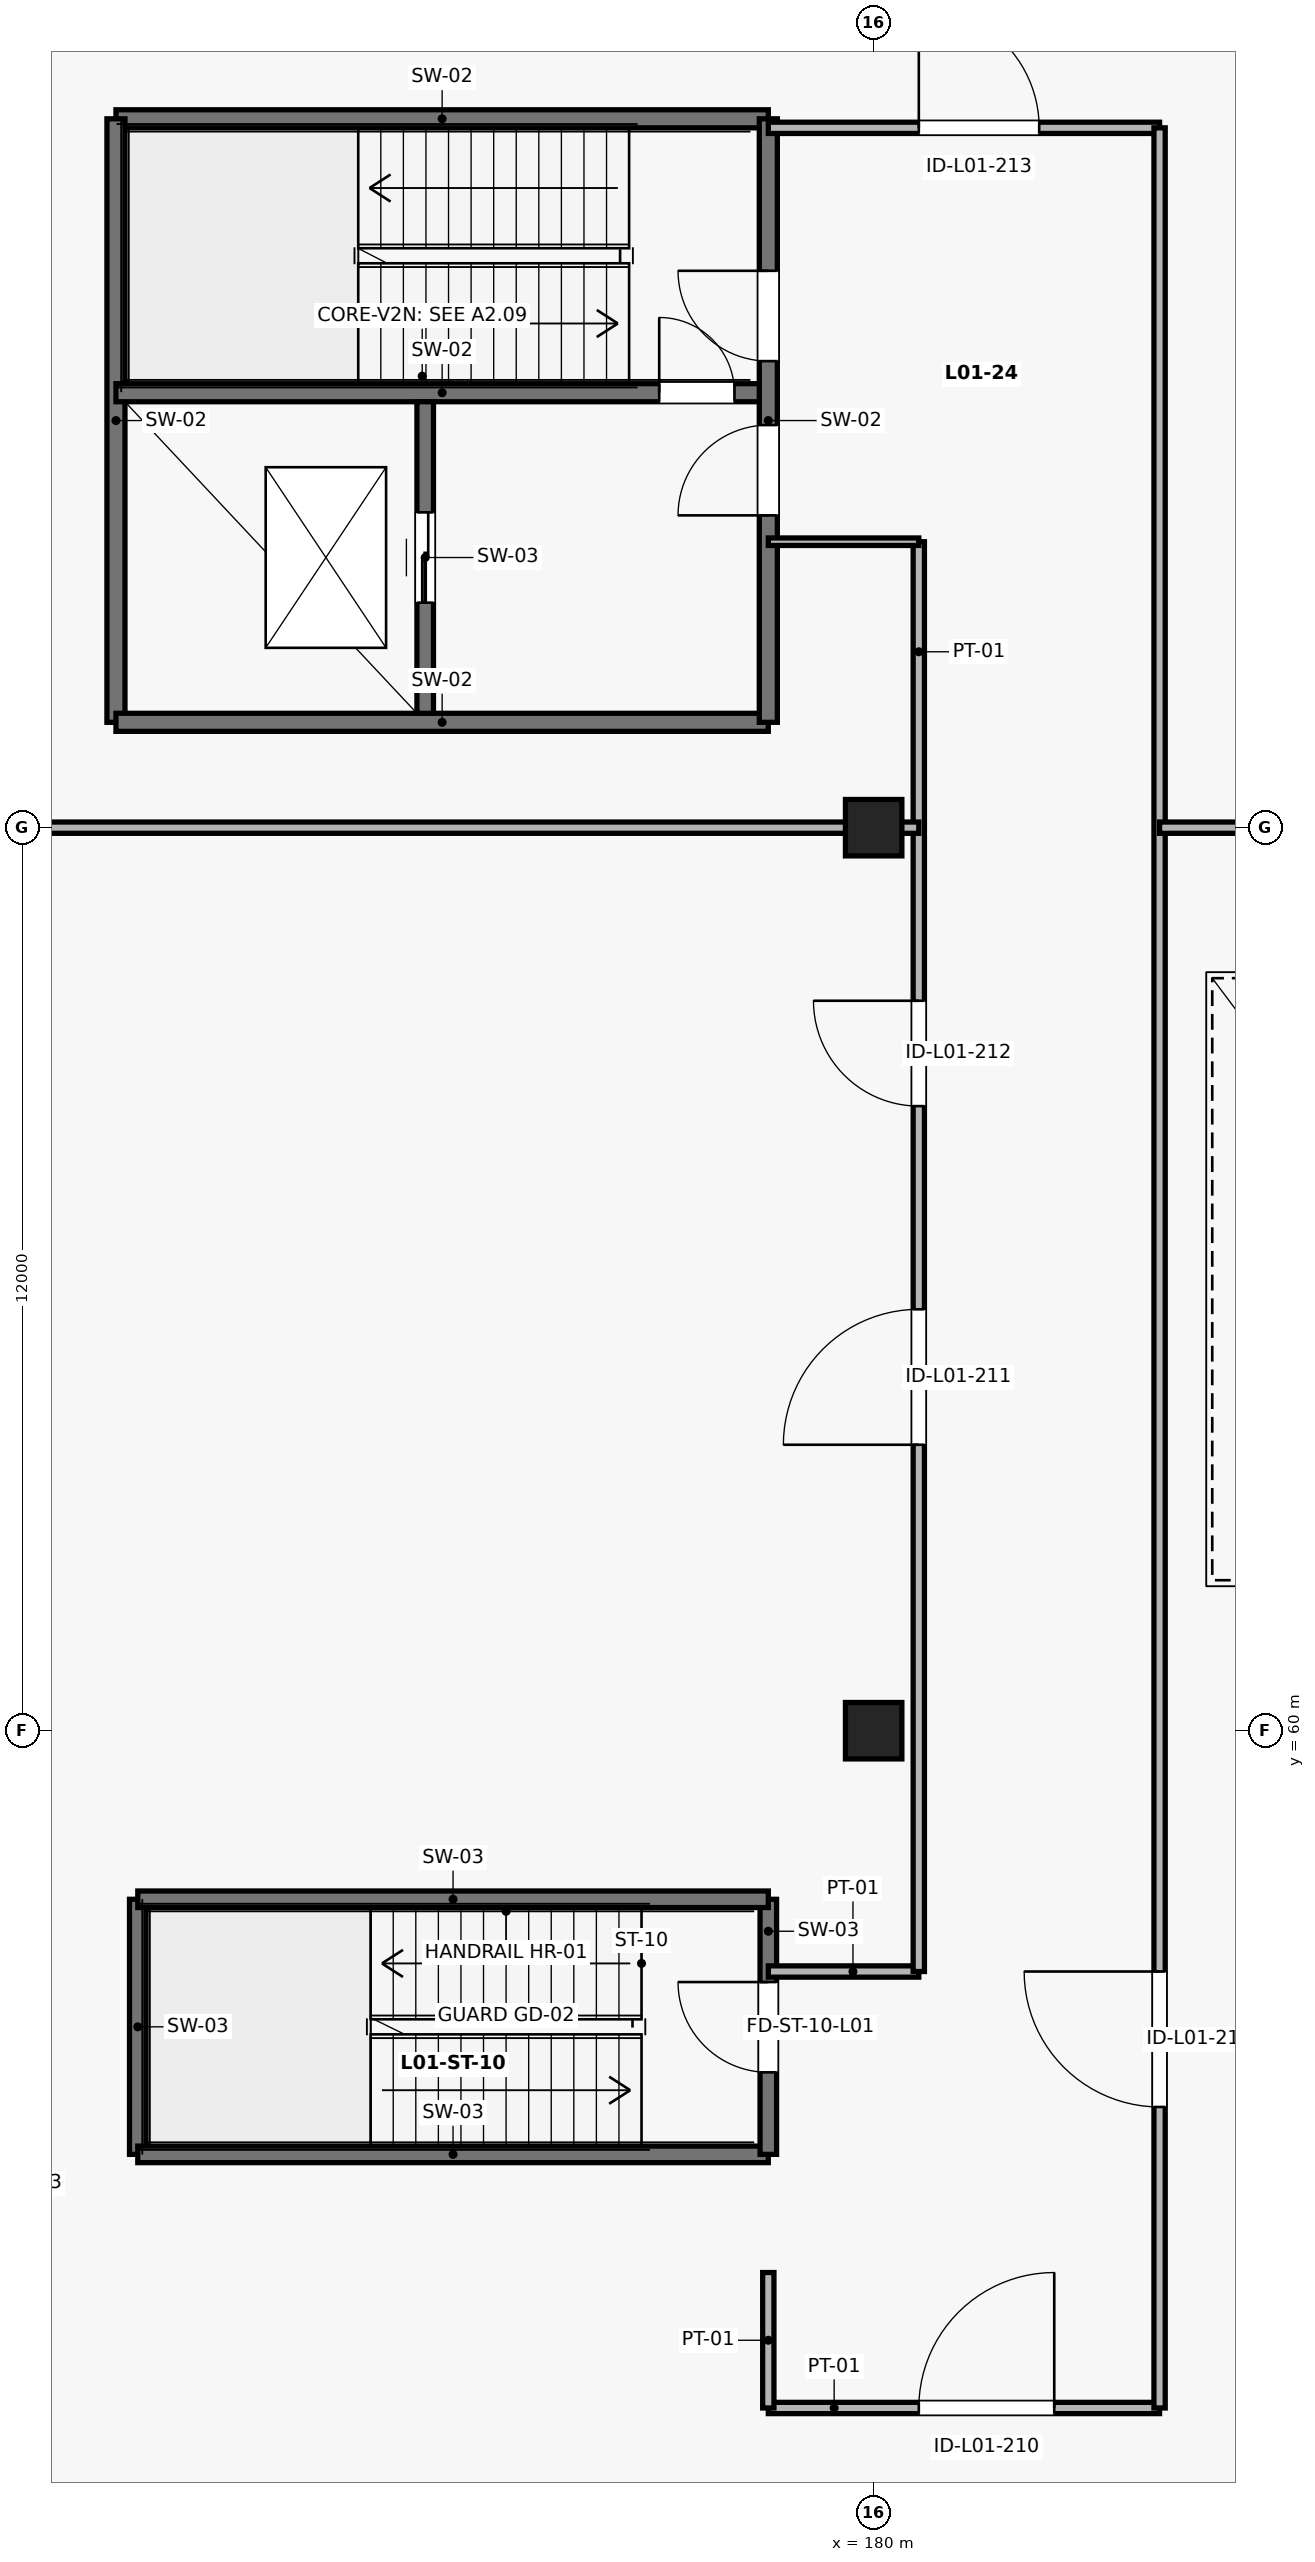
"""IFC4 building model, lengths in metres.
Left out: names, types, materials, properties, quantities, classifications, styles, units other than length and angle.
Written with IfcOpenShell. Run it as: python <this file> out.ifc"""

import sys

from ifc_helpers import new_model, si_unit, direction, frame, frame_2d, origin, origin_2d, place, context, subcontext, project, spatial, rectangle, extrude, element, fill, save


model = new_model("IFC4")
c1 = context("Model", 3, precision=1e-05, world=origin(), true_north=direction((0.0, 1.0)))
c2 = subcontext(c1, "Body", "Model", "MODEL_VIEW")
j1 = project(units=[si_unit("LENGTHUNIT", "METRE"), si_unit("PLANEANGLEUNIT", "RADIAN")], contexts=[c1])
p1 = place(None, origin())
s1 = spatial("IfcSite", under=j1, at=p1, CompositionType="ELEMENT")
p2 = place(p1, origin())
s2 = spatial("IfcBuilding", under=s1, at=p2, CompositionType="ELEMENT")
p3 = place(p2, frame((0.0, 0.0, 6.6)))
s3 = spatial("IfcBuildingStorey", under=s2, at=p3, CompositionType="ELEMENT", Elevation=6.6)
for number, where, z_axis, x_axis in (
    (1, (180.0, 60.0, 0.0), (0.0, 0.0, 1.0), (1.0, 0.0, 0.0)),
    (2, (180.0, 72.0, 0.0), (0.0, 0.0, 1.0), (1.0, 0.0, 0.0)),
):
    element("IfcColumn", number, at=place(p3, frame(where, z_axis=z_axis, x_axis=x_axis)), inside=s3, PredefinedType="COLUMN", context=c2, shape_type="SweptSolid", body=[
        extrude(rectangle(XDim=0.75, YDim=0.75, at=origin_2d()), origin(), (0.0, 0.0, 1.0), 4.8),
    ])
p4 = place(p3, frame((178.6, 81.42, 0.0), z_axis=(0.0, 0.0, 1.0), x_axis=(-1.0, 0.0, 0.0)))
e3 = element("IfcWall", 3, at=p4, inside=s3, PredefinedType="SHEAR", context=c2, shape_type="SweptSolid", body=[
    extrude(rectangle(XDim=8.67, YDim=0.24, at=frame_2d((4.335, 0.0))), origin(), (0.0, 0.0, 1.0), 4.45),
])
p5 = place(p3, frame((169.93, 81.42, 0.0), z_axis=(0.0, 0.0, 1.0), x_axis=(0.0, -1.0, 0.0)))
e4 = element("IfcWall", 4, at=p5, inside=s3, PredefinedType="SHEAR", context=c2, shape_type="SweptSolid", body=[
    extrude(rectangle(XDim=8.02, YDim=0.24, at=frame_2d((4.01, 0.0))), origin(), (0.0, 0.0, 1.0), 4.45),
])
p6 = place(p3, frame((169.93, 73.4, 0.0), z_axis=(0.0, 0.0, 1.0), x_axis=(1.0, 0.0, 0.0)))
e5 = element("IfcWall", 5, at=p6, inside=s3, PredefinedType="SHEAR", context=c2, shape_type="SweptSolid", body=[
    extrude(rectangle(XDim=8.67, YDim=0.24, at=frame_2d((4.335, 0.0))), origin(), (0.0, 0.0, 1.0), 4.45),
])
p7 = place(p3, frame((169.93, 77.78, 0.0), z_axis=(0.0, 0.0, 1.0), x_axis=(1.0, 0.0, 0.0)))
e6 = element("IfcWall", 6, at=p7, inside=s3, PredefinedType="SHEAR", context=c2, shape_type="SweptSolid", body=[
    extrude(rectangle(XDim=8.67, YDim=0.24, at=frame_2d((4.335, 0.0))), origin(), (0.0, 0.0, 1.0), 4.45),
])
p8 = place(p7, frame((7.22, 0.0, 0.0)))
e7 = element("IfcOpeningElement", 7, at=p8, cuts=e6, PredefinedType="OPENING", context=c2, shape_type="SweptSolid", body=[
    extrude(rectangle(XDim=1.0, YDim=2.2, at=frame_2d((0.5, 1.1))), frame((0.0, 0.135, 0.0), z_axis=(0.0, -1.0, 0.0), x_axis=(1.0, 0.0, 0.0)), (0.0, 0.0, 1.0), 0.27),
])
p9 = place(p3, frame((178.6, 73.4, 0.0), z_axis=(0.0, 0.0, 1.0), x_axis=(0.0, 1.0, 0.0)))
e8 = element("IfcWall", 8, at=p9, inside=s3, PredefinedType="SHEAR", context=c2, shape_type="SweptSolid", body=[
    extrude(rectangle(XDim=8.02, YDim=0.24, at=frame_2d((4.01, 0.0))), origin(), (0.0, 0.0, 1.0), 4.45),
])
p10 = place(p9, frame((2.75, 0.0, 0.0)))
e9 = element("IfcOpeningElement", 9, at=p10, cuts=e8, PredefinedType="OPENING", context=c2, shape_type="SweptSolid", body=[
    extrude(rectangle(XDim=1.2, YDim=2.2, at=frame_2d((0.6, 1.1))), frame((0.0, 0.135, 0.0), z_axis=(0.0, -1.0, 0.0), x_axis=(1.0, 0.0, 0.0)), (0.0, 0.0, 1.0), 0.27),
])
p11 = place(p9, frame((4.8, 0.0, 0.0)))
e10 = element("IfcOpeningElement", 10, at=p11, cuts=e8, PredefinedType="OPENING", context=c2, shape_type="SweptSolid", body=[
    extrude(rectangle(XDim=1.2, YDim=2.2, at=frame_2d((0.6, 1.1))), frame((0.0, 0.135, 0.0), z_axis=(0.0, -1.0, 0.0), x_axis=(1.0, 0.0, 0.0)), (0.0, 0.0, 1.0), 0.27),
])
p12 = place(p3, frame((174.04, 73.52, 0.0), z_axis=(0.0, 0.0, 1.0), x_axis=(0.0, 1.0, 0.0)))
e11 = element("IfcWall", 11, at=p12, inside=s3, PredefinedType="SHEAR", context=c2, shape_type="SweptSolid", body=[
    extrude(rectangle(XDim=4.14, YDim=0.22, at=frame_2d((2.07, 0.0))), origin(), (0.0, 0.0, 1.0), 4.45),
])
p13 = place(p12, frame((1.47, 0.0, 0.0)))
e12 = element("IfcOpeningElement", 12, at=p13, cuts=e11, PredefinedType="OPENING", context=c2, shape_type="SweptSolid", body=[
    extrude(rectangle(XDim=1.2, YDim=2.2, at=frame_2d((0.6, 1.1))), frame((0.0, 0.125, 0.0), z_axis=(0.0, -1.0, 0.0), x_axis=(1.0, 0.0, 0.0)), (0.0, 0.0, 1.0), 0.25),
])
p14 = place(p3, frame((170.22, 57.76, 0.0), z_axis=(0.0, 0.0, 1.0), x_axis=(0.0, -1.0, 0.0)))
e13 = element("IfcWall", 13, at=p14, inside=s3, PredefinedType="SHEAR", context=c2, shape_type="SweptSolid", body=[
    extrude(rectangle(XDim=3.39, YDim=0.22, at=frame_2d((1.695, 0.0))), origin(), (0.0, 0.0, 1.0), 4.47),
])
p15 = place(p3, frame((170.22, 54.37, 0.0), z_axis=(0.0, 0.0, 1.0), x_axis=(1.0, 0.0, 0.0)))
e14 = element("IfcWall", 14, at=p15, inside=s3, PredefinedType="SHEAR", context=c2, shape_type="SweptSolid", body=[
    extrude(rectangle(XDim=8.38, YDim=0.22, at=frame_2d((4.19, 0.0))), origin(), (0.0, 0.0, 1.0), 4.47),
])
p16 = place(p3, frame((178.6, 54.37, 0.0), z_axis=(0.0, 0.0, 1.0), x_axis=(0.0, 1.0, 0.0)))
e15 = element("IfcWall", 15, at=p16, inside=s3, PredefinedType="SHEAR", context=c2, shape_type="SweptSolid", body=[
    extrude(rectangle(XDim=3.39, YDim=0.22, at=frame_2d((1.695, 0.0))), origin(), (0.0, 0.0, 1.0), 4.47),
])
p17 = place(p16, frame((1.09, 0.0, 0.0)))
e16 = element("IfcOpeningElement", 16, at=p17, cuts=e15, PredefinedType="OPENING", context=c2, shape_type="SweptSolid", body=[
    extrude(rectangle(XDim=1.2, YDim=2.2, at=frame_2d((0.6, 1.1))), frame((0.0, 0.125, 0.0), z_axis=(0.0, -1.0, 0.0), x_axis=(1.0, 0.0, 0.0)), (0.0, 0.0, 1.0), 0.25),
])
p18 = place(p3, frame((178.6, 57.76, 0.0), z_axis=(0.0, 0.0, 1.0), x_axis=(-1.0, 0.0, 0.0)))
e17 = element("IfcWall", 17, at=p18, inside=s3, PredefinedType="SHEAR", context=c2, shape_type="SweptSolid", body=[
    extrude(rectangle(XDim=8.38, YDim=0.22, at=frame_2d((4.19, 0.0))), origin(), (0.0, 0.0, 1.0), 4.47),
])
p19 = place(p3, frame((178.6, 51.0, 0.0), z_axis=(0.0, 0.0, 1.0), x_axis=(1.0, 0.0, 0.0)))
e18 = element("IfcWall", 18, at=p19, inside=s3, PredefinedType="PARTITIONING", context=c2, shape_type="SweptSolid", body=[
    extrude(rectangle(XDim=5.2, YDim=0.15, at=frame_2d((2.6, 0.0))), origin(), (0.0, 0.0, 1.0), 3.253),
])
p20 = place(p19, frame((2.0, 0.0, 0.0)))
e19 = element("IfcOpeningElement", 19, at=p20, cuts=e18, PredefinedType="OPENING", context=c2, shape_type="SweptSolid", body=[
    extrude(rectangle(XDim=1.8, YDim=2.2, at=frame_2d((0.9, 1.1))), frame((0.0, 0.09, 0.0), z_axis=(0.0, -1.0, 0.0), x_axis=(1.0, 0.0, 0.0)), (0.0, 0.0, 1.0), 0.18),
])
p21 = place(p3, frame((178.6, 51.0, 0.0), z_axis=(0.0, 0.0, 1.0), x_axis=(0.0, 1.0, 0.0)))
e20 = element("IfcWall", 20, at=p21, inside=s3, PredefinedType="PARTITIONING", context=c2, shape_type="SweptSolid", body=[
    extrude(rectangle(XDim=1.8, YDim=0.15, at=frame_2d((0.9, 0.0))), origin(), (0.0, 0.0, 1.0), 4.46),
])
p22 = place(p3, frame((178.6, 56.8, 0.0), z_axis=(0.0, 0.0, 1.0), x_axis=(1.0, 0.0, 0.0)))
e21 = element("IfcWall", 21, at=p22, inside=s3, PredefinedType="PARTITIONING", context=c2, shape_type="SweptSolid", body=[
    extrude(rectangle(XDim=2.0, YDim=0.15, at=frame_2d((1.0, 0.0))), origin(), (0.0, 0.0, 1.0), 3.253),
])
p23 = place(p3, frame((180.6, 56.8, 0.0), z_axis=(0.0, 0.0, 1.0), x_axis=(0.0, 1.0, 0.0)))
e22 = element("IfcWall", 22, at=p23, inside=s3, PredefinedType="PARTITIONING", context=c2, shape_type="SweptSolid", body=[
    extrude(rectangle(XDim=19.0, YDim=0.15, at=frame_2d((9.5, 0.0))), origin(), (0.0, 0.0, 1.0), 3.153),
])
p24 = place(p23, frame((7.0, 0.0, 0.0)))
e23 = element("IfcOpeningElement", 23, at=p24, cuts=e22, PredefinedType="OPENING", context=c2, shape_type="SweptSolid", body=[
    extrude(rectangle(XDim=1.8, YDim=2.2, at=frame_2d((0.9, 1.1))), frame((0.0, 0.09, 0.0), z_axis=(0.0, -1.0, 0.0), x_axis=(1.0, 0.0, 0.0)), (0.0, 0.0, 1.0), 0.18),
])
p25 = place(p23, frame((11.5, 0.0, 0.0)))
e24 = element("IfcOpeningElement", 24, at=p25, cuts=e22, PredefinedType="OPENING", context=c2, shape_type="SweptSolid", body=[
    extrude(rectangle(XDim=1.4, YDim=2.2, at=frame_2d((0.7, 1.1))), frame((0.0, 0.09, 0.0), z_axis=(0.0, -1.0, 0.0), x_axis=(1.0, 0.0, 0.0)), (0.0, 0.0, 1.0), 0.18),
])
p26 = place(p3, frame((178.6, 75.8, 0.0), z_axis=(0.0, 0.0, 1.0), x_axis=(1.0, 0.0, 0.0)))
e25 = element("IfcWall", 25, at=p26, inside=s3, PredefinedType="PARTITIONING", context=c2, shape_type="SweptSolid", body=[
    extrude(rectangle(XDim=2.0, YDim=0.1, at=frame_2d((1.0, 0.0))), origin(), (0.0, 0.0, 1.0), 3.633),
])
p27 = place(p3, frame((178.6, 81.3, 0.0), z_axis=(0.0, 0.0, 1.0), x_axis=(1.0, 0.0, 0.0)))
e26 = element("IfcWall", 26, at=p27, inside=s3, PredefinedType="PARTITIONING", context=c2, shape_type="SweptSolid", body=[
    extrude(rectangle(XDim=5.2, YDim=0.15, at=frame_2d((2.6, 0.0))), origin(), (0.0, 0.0, 1.0), 3.633),
])
p28 = place(p27, frame((2.0, 0.0, 0.0)))
e27 = element("IfcOpeningElement", 27, at=p28, cuts=e26, PredefinedType="OPENING", context=c2, shape_type="SweptSolid", body=[
    extrude(rectangle(XDim=1.6, YDim=2.2, at=frame_2d((0.8, 1.1))), frame((0.0, 0.09, 0.0), z_axis=(0.0, -1.0, 0.0), x_axis=(1.0, 0.0, 0.0)), (0.0, 0.0, 1.0), 0.18),
])
p29 = place(p3, frame((183.8, 51.0, 0.0), z_axis=(0.0, 0.0, 1.0), x_axis=(0.0, 1.0, 0.0)))
e28 = element("IfcWall", 28, at=p29, inside=s3, PredefinedType="PARTITIONING", context=c2, shape_type="SweptSolid", body=[
    extrude(rectangle(XDim=30.3, YDim=0.15, at=frame_2d((15.15, 0.0))), origin(), (0.0, 0.0, 1.0), 3.153),
])
p30 = place(p29, frame((4.0, 0.0, 0.0)))
e29 = element("IfcOpeningElement", 29, at=p30, cuts=e28, PredefinedType="OPENING", context=c2, shape_type="SweptSolid", body=[
    extrude(rectangle(XDim=1.8, YDim=2.2, at=frame_2d((0.9, 1.1))), frame((0.0, 0.09, 0.0), z_axis=(0.0, -1.0, 0.0), x_axis=(1.0, 0.0, 0.0)), (0.0, 0.0, 1.0), 0.18),
])
p31 = place(p3, frame((168.0, 72.0, 0.0), z_axis=(0.0, 0.0, 1.0), x_axis=(1.0, 0.0, 0.0)))
e30 = element("IfcWall", 30, at=p31, inside=s3, PredefinedType="PARTITIONING", context=c2, shape_type="SweptSolid", body=[
    extrude(rectangle(XDim=12.6, YDim=0.15, at=frame_2d((6.3, 0.0))), origin(), (0.0, 0.0, 1.0), 3.033),
])
p32 = place(p3, frame((183.8, 72.0, 0.0), z_axis=(0.0, 0.0, 1.0), x_axis=(1.0, 0.0, 0.0)))
e31 = element("IfcWall", 31, at=p32, inside=s3, PredefinedType="PARTITIONING", context=c2, shape_type="SweptSolid", body=[
    extrude(rectangle(XDim=8.02, YDim=0.15, at=frame_2d((4.01, 0.0))), origin(), (0.0, 0.0, 1.0), 3.153),
])
p33 = place(p10, origin())
e32 = element("IfcDoor", 32, at=p33, inside=s3, OperationType="SINGLE_SWING_LEFT", PredefinedType="DOOR", context=c2, shape_type="SweptSolid", body=[
    extrude(rectangle(XDim=1.2, YDim=2.2, at=frame_2d((0.6, 1.1))), frame((0.0, 0.025, 0.0), z_axis=(0.0, -1.0, 0.0), x_axis=(1.0, 0.0, 0.0)), (0.0, 0.0, 1.0), 0.05),
])
fill(e9, e32)
p34 = place(p11, origin())
e33 = element("IfcDoor", 33, at=p34, inside=s3, OperationType="SINGLE_SWING_RIGHT", PredefinedType="DOOR", context=c2, shape_type="SweptSolid", body=[
    extrude(rectangle(XDim=1.2, YDim=2.2, at=frame_2d((0.6, 1.1))), frame((0.0, 0.025, 0.0), z_axis=(0.0, -1.0, 0.0), x_axis=(1.0, 0.0, 0.0)), (0.0, 0.0, 1.0), 0.05),
])
fill(e10, e33)
p35 = place(p8, origin())
e34 = element("IfcDoor", 34, at=p35, inside=s3, OperationType="SINGLE_SWING_LEFT", PredefinedType="DOOR", context=c2, shape_type="SweptSolid", body=[
    extrude(rectangle(XDim=1.0, YDim=2.2, at=frame_2d((0.5, 1.1))), frame((0.0, 0.025, 0.0), z_axis=(0.0, -1.0, 0.0), x_axis=(1.0, 0.0, 0.0)), (0.0, 0.0, 1.0), 0.05),
])
fill(e7, e34)
p36 = place(p13, origin())
e35 = element("IfcDoor", 35, at=p36, inside=s3, OperationType="DOUBLE_DOOR_SLIDING", PredefinedType="DOOR", context=c2, shape_type="SweptSolid", body=[
    extrude(rectangle(XDim=1.2, YDim=2.2, at=frame_2d((0.6, 1.1))), frame((0.0, 0.025, 0.0), z_axis=(0.0, -1.0, 0.0), x_axis=(1.0, 0.0, 0.0)), (0.0, 0.0, 1.0), 0.05),
])
fill(e12, e35)
p37 = place(p17, origin())
e36 = element("IfcDoor", 36, at=p37, inside=s3, OperationType="SINGLE_SWING_RIGHT", PredefinedType="DOOR", context=c2, shape_type="SweptSolid", body=[
    extrude(rectangle(XDim=1.2, YDim=2.2, at=frame_2d((0.6, 1.1))), frame((0.0, 0.025, 0.0), z_axis=(0.0, -1.0, 0.0), x_axis=(1.0, 0.0, 0.0)), (0.0, 0.0, 1.0), 0.05),
])
fill(e16, e36)
p38 = place(p20, origin())
e37 = element("IfcDoor", 37, at=p38, inside=s3, OperationType="SINGLE_SWING_RIGHT", PredefinedType="DOOR", context=c2, shape_type="SweptSolid", body=[
    extrude(rectangle(XDim=1.8, YDim=2.2, at=frame_2d((0.9, 1.1))), frame((0.0, 0.025, 0.0), z_axis=(0.0, -1.0, 0.0), x_axis=(1.0, 0.0, 0.0)), (0.0, 0.0, 1.0), 0.05),
])
fill(e19, e37)
p39 = place(p24, origin())
e38 = element("IfcDoor", 38, at=p39, inside=s3, OperationType="SINGLE_SWING_LEFT", PredefinedType="DOOR", context=c2, shape_type="SweptSolid", body=[
    extrude(rectangle(XDim=1.8, YDim=2.2, at=frame_2d((0.9, 1.1))), frame((0.0, 0.025, 0.0), z_axis=(0.0, -1.0, 0.0), x_axis=(1.0, 0.0, 0.0)), (0.0, 0.0, 1.0), 0.05),
])
fill(e23, e38)
p40 = place(p25, origin())
e39 = element("IfcDoor", 39, at=p40, inside=s3, OperationType="SINGLE_SWING_RIGHT", PredefinedType="DOOR", context=c2, shape_type="SweptSolid", body=[
    extrude(rectangle(XDim=1.4, YDim=2.2, at=frame_2d((0.7, 1.1))), frame((0.0, 0.025, 0.0), z_axis=(0.0, -1.0, 0.0), x_axis=(1.0, 0.0, 0.0)), (0.0, 0.0, 1.0), 0.05),
])
fill(e24, e39)
p41 = place(p28, origin())
e40 = element("IfcDoor", 40, at=p41, inside=s3, OperationType="SINGLE_SWING_LEFT", PredefinedType="DOOR", context=c2, shape_type="SweptSolid", body=[
    extrude(rectangle(XDim=1.6, YDim=2.2, at=frame_2d((0.8, 1.1))), frame((0.0, 0.025, 0.0), z_axis=(0.0, -1.0, 0.0), x_axis=(1.0, 0.0, 0.0)), (0.0, 0.0, 1.0), 0.05),
])
fill(e27, e40)
p42 = place(p30, origin())
e41 = element("IfcDoor", 41, at=p42, inside=s3, OperationType="SINGLE_SWING_RIGHT", PredefinedType="DOOR", context=c2, shape_type="SweptSolid", body=[
    extrude(rectangle(XDim=1.8, YDim=2.2, at=frame_2d((0.9, 1.1))), frame((0.0, 0.025, 0.0), z_axis=(0.0, -1.0, 0.0), x_axis=(1.0, 0.0, 0.0)), (0.0, 0.0, 1.0), 0.05),
])
fill(e29, e41)
save(model, sys.argv[1])
